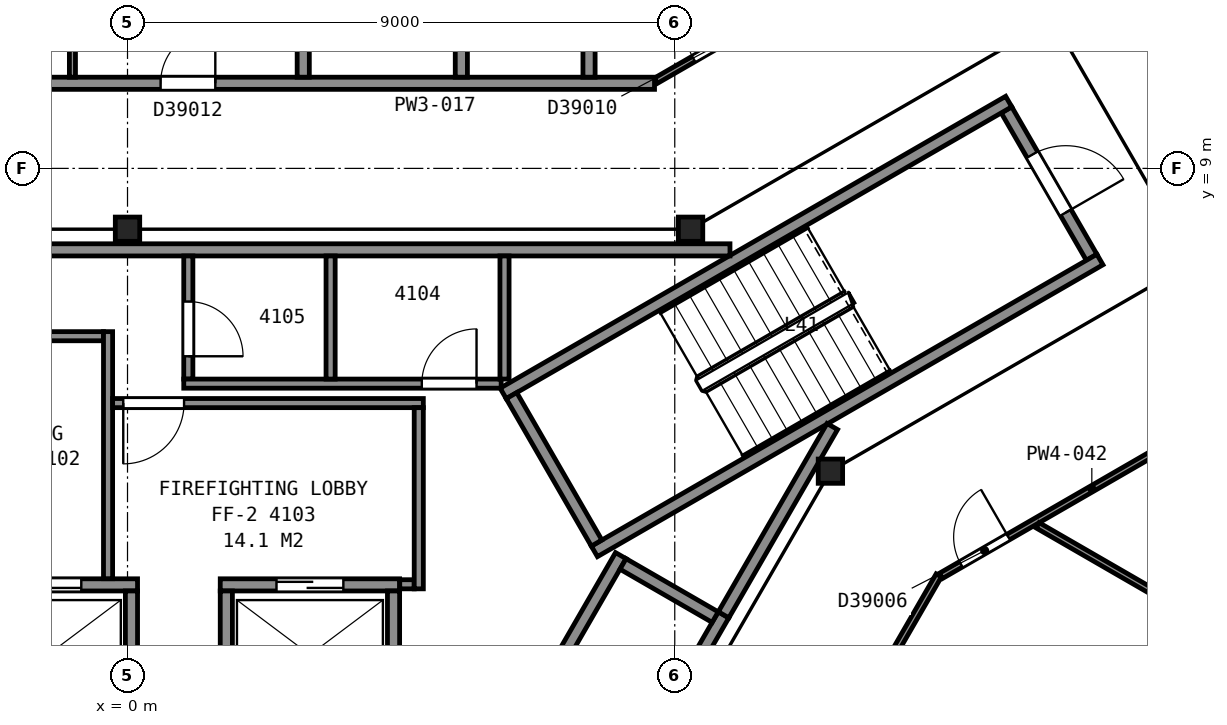
"""IFC4 building model, lengths in metres.
Left out: names, types, materials, properties, quantities, classifications, styles, units other than length and angle.
Written with IfcOpenShell. Run it as: python <this file> out.ifc"""

import sys

from ifc_helpers import new_model, si_unit, direction, frame, frame_2d, origin, origin_2d, place, context, subcontext, project, spatial, rectangle, i_section, extrude, element, fill, save


model = new_model("IFC4")
c1 = context("Model", 3, precision=1e-05, world=origin(), true_north=direction((0.0, 1.0)))
c2 = subcontext(c1, "Body", "Model", "MODEL_VIEW")
j1 = project(units=[si_unit("LENGTHUNIT", "METRE"), si_unit("PLANEANGLEUNIT", "RADIAN")], contexts=[c1])
p1 = place(None, origin())
s1 = spatial("IfcSite", under=j1, at=p1, CompositionType="ELEMENT")
p2 = place(p1, origin())
s2 = spatial("IfcBuilding", under=s1, at=p2, CompositionType="ELEMENT")
p3 = place(p2, frame((0.0, 0.0, 167.3)))
s3 = spatial("IfcBuildingStorey", under=s2, at=p3, CompositionType="ELEMENT", Elevation=167.3)
for number, where, z_axis, x_axis in (
    (1, (11.56, 4.02, 0.0), (0.0, 0.0, 1.0), (1.0, 0.0, 0.0)),
    (2, (9.26, 8.0, 0.0), (0.0, 0.0, 1.0), (1.0, 0.0, 0.0)),
    (3, (0.0, 8.0, 0.0), (0.0, 0.0, 1.0), (1.0, 0.0, 0.0)),
):
    element("IfcColumn", number, at=place(p3, frame(where, z_axis=z_axis, x_axis=x_axis)), inside=s3, PredefinedType="COLUMN", context=c2, shape_type="SweptSolid", body=[
        extrude(i_section(OverallWidth=0.401, OverallDepth=0.399, WebThickness=0.025, FlangeThickness=0.04, FilletRadius=0.015, at=origin_2d()), origin(), (0.0, 0.0, 1.0), 3.7),
    ])
p4 = place(p3, frame((15.855, 7.538, 0.0), z_axis=(0.0, 0.0, 1.0), x_axis=(-0.500049511043, 0.865996816683, 0.0)))
e4 = element("IfcWall", 4, at=p4, inside=s3, PredefinedType="PARTITIONING", context=c2, shape_type="SweptSolid", body=[
    extrude(rectangle(XDim=2.8, YDim=0.2, at=frame_2d((1.4, 0.0))), origin(), (0.0, 0.0, 1.0), 3.45),
])
p5 = place(p4, frame((0.85, 0.0, 0.0)))
e5 = element("IfcOpeningElement", 5, at=p5, cuts=e4, PredefinedType="OPENING", context=c2, shape_type="SweptSolid", body=[
    extrude(rectangle(XDim=1.1, YDim=2.1, at=frame_2d((0.55, 1.05))), frame((0.0, 0.11, 0.0), z_axis=(0.0, -1.0, 0.0), x_axis=(1.0, 0.0, 0.0)), (0.0, 0.0, 1.0), 0.22),
])
for number, where, z_axis, x_axis in (
    (6, (6.178, 5.299, 0.0), (0.0, 0.0, 1.0), (0.866, 0.5, 0.0)),
    (7, (7.678, 2.701, 0.0), (0.0, 0.0, 1.0), (0.866, 0.5, 0.0)),
):
    element("IfcWall", number, at=place(p3, frame(where, z_axis=z_axis, x_axis=x_axis)), inside=s3, PredefinedType="PARTITIONING", context=c2, shape_type="SweptSolid", body=[
        extrude(rectangle(XDim=9.6, YDim=0.2, at=frame_2d((4.8, 0.0))), origin(), (0.0, 0.0, 1.0), 3.45),
    ])
p6 = place(p3, frame((7.715, 2.838, 0.0), z_axis=(0.0, 0.0, 1.0), x_axis=(-0.500049511043, 0.865996816683, 0.0)))
e8 = element("IfcWall", 8, at=p6, inside=s3, PredefinedType="PARTITIONING", context=c2, shape_type="SweptSolid", body=[
    extrude(rectangle(XDim=2.8, YDim=0.2, at=frame_2d((1.4, 0.0))), origin(), (0.0, 0.0, 1.0), 3.45),
])
p7 = place(p3, frame((-2.785, 2.15, 0.0), z_axis=(0.0, 0.0, 1.0), x_axis=(1.0, 0.0, 0.0)))
e9 = element("IfcWall", 9, at=p7, inside=s3, PredefinedType="PARTITIONING", context=c2, shape_type="SweptSolid", body=[
    extrude(rectangle(XDim=2.95, YDim=0.2, at=frame_2d((1.475, 0.0))), origin(), (0.0, 0.0, 1.0), 3.7),
])
p8 = place(p7, frame((0.925, 0.0, 0.0)))
e10 = element("IfcOpeningElement", 10, at=p8, cuts=e9, PredefinedType="OPENING", context=c2, shape_type="SweptSolid", body=[
    extrude(rectangle(XDim=1.1, YDim=2.1, at=frame_2d((0.55, 1.05))), frame((0.0, 0.11, 0.0), z_axis=(0.0, -1.0, 0.0), x_axis=(1.0, 0.0, 0.0)), (0.0, 0.0, 1.0), 0.22),
])
p9 = place(p3, frame((1.525, 2.15, 0.0), z_axis=(0.0, 0.0, 1.0), x_axis=(1.0, 0.0, 0.0)))
e11 = element("IfcWall", 11, at=p9, inside=s3, PredefinedType="PARTITIONING", context=c2, shape_type="SweptSolid", body=[
    extrude(rectangle(XDim=2.95, YDim=0.2, at=frame_2d((1.475, 0.0))), origin(), (0.0, 0.0, 1.0), 3.7),
])
p10 = place(p9, frame((0.925, 0.0, 0.0)))
e12 = element("IfcOpeningElement", 12, at=p10, cuts=e11, PredefinedType="OPENING", context=c2, shape_type="SweptSolid", body=[
    extrude(rectangle(XDim=1.1, YDim=2.1, at=frame_2d((0.55, 1.05))), frame((0.0, 0.11, 0.0), z_axis=(0.0, -1.0, 0.0), x_axis=(1.0, 0.0, 0.0)), (0.0, 0.0, 1.0), 0.22),
])
p11 = place(p3, frame((7.351, -2.587, 0.0), z_axis=(0.0, 0.0, 1.0), x_axis=(0.500002801628, 0.866023786258, 0.0)))
e13 = element("IfcWall", 13, at=p11, inside=s3, PredefinedType="PARTITIONING", context=c2, shape_type="SweptSolid", body=[
    extrude(rectangle(XDim=4.9, YDim=0.2, at=frame_2d((2.45, 0.0))), origin(), (0.0, 0.0, 1.0), 3.7),
])
p12 = place(p3, frame((5.663, -1.612, 0.0), z_axis=(0.0, 0.0, 1.0), x_axis=(0.49998122708, 0.866036242063, 0.0)))
e14 = element("IfcWall", 14, at=p12, inside=s3, PredefinedType="PARTITIONING", context=c2, shape_type="SweptSolid", body=[
    extrude(rectangle(XDim=4.9, YDim=0.2, at=frame_2d((2.45, 0.0))), origin(), (0.0, 0.0, 1.0), 3.7),
])
for number, where, z_axis, x_axis in (
    (15, (4.375, 0.1, 0.0), (0.0, 0.0, 1.0), (0.0, 1.0, 0.0)),
    (16, (1.625, 0.1, 0.0), (0.0, 0.0, 1.0), (0.0, 1.0, 0.0)),
    (17, (0.065, 0.1, 0.0), (0.0, 0.0, 1.0), (0.0, 1.0, 0.0)),
):
    element("IfcWall", number, at=place(p3, frame(where, z_axis=z_axis, x_axis=x_axis)), inside=s3, PredefinedType="PARTITIONING", context=c2, shape_type="SweptSolid", body=[
        extrude(rectangle(XDim=1.95, YDim=0.2, at=frame_2d((0.975, 0.0))), origin(), (0.0, 0.0, 1.0), 3.7),
    ])
p13 = place(p3, frame((9.665, 1.62, 0.0), z_axis=(0.0, 0.0, 1.0), x_axis=(-0.866002029911, 0.500040482552, 0.0)))
e18 = element("IfcWall", 18, at=p13, inside=s3, PredefinedType="PARTITIONING", context=c2, shape_type="SweptSolid", body=[
    extrude(rectangle(XDim=1.75, YDim=0.2, at=frame_2d((0.875, 0.0))), origin(), (0.0, 0.0, 1.0), 3.7),
])
p14 = place(p3, frame((-3.933, 6.24, 0.0), z_axis=(0.0, 0.0, 1.0), x_axis=(1.0, 0.0, 0.0)))
e19 = element("IfcWall", 19, at=p14, inside=s3, PredefinedType="PARTITIONING", context=c2, shape_type="SweptSolid", body=[
    extrude(rectangle(XDim=3.538, YDim=0.15, at=frame_2d((1.769, 0.0))), origin(), (0.0, 0.0, 1.0), 3.45),
])
p15 = place(p14, frame((1.3, 0.0, 0.0)))
e20 = element("IfcOpeningElement", 20, at=p15, cuts=e19, PredefinedType="OPENING", context=c2, shape_type="SweptSolid", body=[
    extrude(rectangle(XDim=1.0, YDim=2.1, at=frame_2d((0.5, 1.05))), frame((0.0, 0.085, 0.0), z_axis=(0.0, -1.0, 0.0), x_axis=(1.0, 0.0, 0.0)), (0.0, 0.0, 1.0), 0.17),
])
p16 = place(p3, frame((-3.933, 7.66, 0.0), z_axis=(0.0, 0.0, 1.0), x_axis=(1.0, 0.0, 0.0)))
e21 = element("IfcWall", 21, at=p16, inside=s3, PredefinedType="PARTITIONING", context=c2, shape_type="SweptSolid", body=[
    extrude(rectangle(XDim=13.841, YDim=0.2, at=frame_2d((6.92, 0.0))), origin(), (0.0, 0.0, 1.0), 3.45),
])
p17 = place(p3, frame((-0.32, 2.252, 0.0), z_axis=(0.0, 0.0, 1.0), x_axis=(0.0, 1.0, 0.0)))
e22 = element("IfcWall", 22, at=p17, inside=s3, PredefinedType="PARTITIONING", context=c2, shape_type="SweptSolid", body=[
    extrude(rectangle(XDim=4.063, YDim=0.15, at=frame_2d((2.031, 0.0))), origin(), (0.0, 0.0, 1.0), 3.45),
])
p18 = place(p3, frame((-0.245, 5.14, 0.0), z_axis=(0.0, 0.0, 1.0), x_axis=(1.0, 0.0, 0.0)))
e23 = element("IfcWall", 23, at=p18, inside=s3, PredefinedType="PARTITIONING", context=c2, shape_type="SweptSolid", body=[
    extrude(rectangle(XDim=5.11, YDim=0.15, at=frame_2d((2.555, 0.0))), origin(), (0.0, 0.0, 1.0), 3.45),
])
p19 = place(p18, frame((0.175, 0.0, 0.0)))
e24 = element("IfcOpeningElement", 24, at=p19, cuts=e23, PredefinedType="OPENING", context=c2, shape_type="SweptSolid", body=[
    extrude(rectangle(XDim=1.0, YDim=2.1, at=frame_2d((0.5, 1.05))), frame((0.0, 0.085, 0.0), z_axis=(0.0, -1.0, 0.0), x_axis=(1.0, 0.0, 0.0)), (0.0, 0.0, 1.0), 0.17),
])
p20 = place(p3, frame((1.0, 7.56, 0.0), z_axis=(0.0, 0.0, 1.0), x_axis=(0.0, -1.0, 0.0)))
e25 = element("IfcWall", 25, at=p20, inside=s3, PredefinedType="PARTITIONING", context=c2, shape_type="SweptSolid", body=[
    extrude(rectangle(XDim=2.025, YDim=0.15, at=frame_2d((1.013, 0.0))), origin(), (0.0, 0.0, 1.0), 3.45),
])
p21 = place(p20, frame((0.75, 0.0, 0.0)))
e26 = element("IfcOpeningElement", 26, at=p21, cuts=e25, PredefinedType="OPENING", context=c2, shape_type="SweptSolid", body=[
    extrude(rectangle(XDim=0.9, YDim=2.1, at=frame_2d((0.45, 1.05))), frame((0.0, 0.085, 0.0), z_axis=(0.0, -1.0, 0.0), x_axis=(1.0, 0.0, 0.0)), (0.0, 0.0, 1.0), 0.17),
])
p22 = place(p3, frame((0.925, 5.46, 0.0), z_axis=(0.0, 0.0, 1.0), x_axis=(1.0, 0.0, 0.0)))
e27 = element("IfcWall", 27, at=p22, inside=s3, PredefinedType="PARTITIONING", context=c2, shape_type="SweptSolid", body=[
    extrude(rectangle(XDim=5.22, YDim=0.15, at=frame_2d((2.61, 0.0))), origin(), (0.0, 0.0, 1.0), 3.45),
])
p23 = place(p22, frame((3.915, 0.0, 0.0)))
e28 = element("IfcOpeningElement", 28, at=p23, cuts=e27, PredefinedType="OPENING", context=c2, shape_type="SweptSolid", body=[
    extrude(rectangle(XDim=0.9, YDim=2.1, at=frame_2d((0.45, 1.05))), frame((0.0, 0.085, 0.0), z_axis=(0.0, -1.0, 0.0), x_axis=(1.0, 0.0, 0.0)), (0.0, 0.0, 1.0), 0.17),
])
p24 = place(p3, frame((3.34, 5.535, 0.0), z_axis=(0.0, 0.0, 1.0), x_axis=(0.0, 1.0, 0.0)))
e29 = element("IfcWall", 29, at=p24, inside=s3, PredefinedType="PARTITIONING", context=c2, shape_type="SweptSolid", body=[
    extrude(rectangle(XDim=2.025, YDim=0.15, at=frame_2d((1.013, 0.0))), origin(), (0.0, 0.0, 1.0), 3.45),
])
p25 = place(p3, frame((4.477, 2.16, 0.0), z_axis=(0.0, 0.0, 1.0), x_axis=(1.0, 0.0, 0.0)))
e30 = element("IfcWall", 30, at=p25, inside=s3, PredefinedType="PARTITIONING", context=c2, shape_type="SweptSolid", body=[
    extrude(rectangle(XDim=0.238, YDim=0.15, at=frame_2d((0.119, 0.0))), origin(), (0.0, 0.0, 1.0), 3.45),
])
p26 = place(p3, frame((4.79, 2.085, 0.0), z_axis=(0.0, 0.0, 1.0), x_axis=(0.0, 1.0, 0.0)))
e31 = element("IfcWall", 31, at=p26, inside=s3, PredefinedType="PARTITIONING", context=c2, shape_type="SweptSolid", body=[
    extrude(rectangle(XDim=2.98, YDim=0.15, at=frame_2d((1.49, 0.0))), origin(), (0.0, 0.0, 1.0), 3.45),
])
p27 = place(p3, frame((6.2, 5.535, 0.0), z_axis=(0.0, 0.0, 1.0), x_axis=(0.0, 1.0, 0.0)))
e32 = element("IfcWall", 32, at=p27, inside=s3, PredefinedType="PARTITIONING", context=c2, shape_type="SweptSolid", body=[
    extrude(rectangle(XDim=2.025, YDim=0.15, at=frame_2d((1.013, 0.0))), origin(), (0.0, 0.0, 1.0), 3.45),
])
p28 = place(p3, frame((9.803, 1.658, 0.0), z_axis=(0.0, 0.0, 1.0), x_axis=(0.499943114462, 0.866058244174, 0.0)))
e33 = element("IfcWall", 33, at=p28, inside=s3, PredefinedType="PARTITIONING", context=c2, shape_type="SweptSolid", body=[
    extrude(rectangle(XDim=3.576, YDim=0.2, at=frame_2d((1.788, 0.0))), origin(), (0.0, 0.0, 1.0), 3.45),
])
p29 = place(p3, frame((-8.667, 10.4, 0.0), z_axis=(0.0, 0.0, 1.0), x_axis=(1.0, 0.0, 0.0)))
e34 = element("IfcWall", 34, at=p29, inside=s3, PredefinedType="PARTITIONING", context=c2, shape_type="SweptSolid", body=[
    extrude(rectangle(XDim=17.334, YDim=0.2, at=frame_2d((8.667, 0.0))), origin(), (0.0, 0.0, 1.0), 2.713),
])
p30 = place(p29, frame((9.211, 0.0, 0.0)))
e35 = element("IfcOpeningElement", 35, at=p30, cuts=e34, PredefinedType="OPENING", context=c2, shape_type="SweptSolid", body=[
    extrude(rectangle(XDim=0.9, YDim=2.1, at=frame_2d((0.45, 1.05))), frame((0.0, 0.11, 0.0), z_axis=(0.0, -1.0, 0.0), x_axis=(1.0, 0.0, 0.0)), (0.0, 0.0, 1.0), 0.22),
])
p31 = place(p29, frame((4.857, 0.0, 0.0)))
e36 = element("IfcOpeningElement", 36, at=p31, cuts=e34, PredefinedType="OPENING", context=c2, shape_type="SweptSolid", body=[
    extrude(rectangle(XDim=0.9, YDim=2.1, at=frame_2d((0.45, 1.05))), frame((0.0, 0.11, 0.0), z_axis=(0.0, -1.0, 0.0), x_axis=(1.0, 0.0, 0.0)), (0.0, 0.0, 1.0), 0.22),
])
p32 = place(p29, frame((1.0, 0.0, 0.0)))
e37 = element("IfcOpeningElement", 37, at=p32, cuts=e34, PredefinedType="OPENING", context=c2, shape_type="SweptSolid", body=[
    extrude(rectangle(XDim=0.9, YDim=2.1, at=frame_2d((0.45, 1.05))), frame((0.0, 0.11, 0.0), z_axis=(0.0, -1.0, 0.0), x_axis=(1.0, 0.0, 0.0)), (0.0, 0.0, 1.0), 0.22),
])
p33 = place(p3, frame((-0.906, 10.5, 0.0), z_axis=(0.0, 0.0, 1.0), x_axis=(0.0, 1.0, 0.0)))
e38 = element("IfcWall", 38, at=p33, inside=s3, PredefinedType="PARTITIONING", context=c2, shape_type="SweptSolid", body=[
    extrude(rectangle(XDim=6.435, YDim=0.1, at=frame_2d((3.218, 0.0))), origin(), (0.0, 0.0, 1.0), 2.713),
])
p34 = place(p3, frame((2.89, 13.5, 0.0), z_axis=(0.0, 0.0, 1.0), x_axis=(0.0, -1.0, 0.0)))
e39 = element("IfcWall", 39, at=p34, inside=s3, PredefinedType="PARTITIONING", context=c2, shape_type="SweptSolid", body=[
    extrude(rectangle(XDim=3.0, YDim=0.2, at=frame_2d((1.5, 0.0))), origin(), (0.0, 0.0, 1.0), 2.713),
])
p35 = place(p34, frame((1.2, 0.0, 0.0)))
e40 = element("IfcOpeningElement", 40, at=p35, cuts=e39, PredefinedType="OPENING", context=c2, shape_type="SweptSolid", body=[
    extrude(rectangle(XDim=0.8, YDim=2.1, at=frame_2d((0.4, 1.05))), frame((0.0, 0.11, 0.0), z_axis=(0.0, -1.0, 0.0), x_axis=(1.0, 0.0, 0.0)), (0.0, 0.0, 1.0), 0.22),
])
p36 = place(p3, frame((13.342, 2.306, 0.0), z_axis=(0.0, 0.0, 1.0), x_axis=(-0.49997635812, -0.866039053, 0.0)))
e41 = element("IfcWall", 41, at=p36, inside=s3, PredefinedType="PARTITIONING", context=c2, shape_type="SweptSolid", body=[
    extrude(rectangle(XDim=17.285, YDim=0.1, at=frame_2d((8.643, 0.0))), origin(), (0.0, 0.0, 1.0), 2.713),
])
p37 = place(p36, frame((15.585, 0.0, 0.0)))
e42 = element("IfcOpeningElement", 42, at=p37, cuts=e41, PredefinedType="OPENING", context=c2, shape_type="SweptSolid", body=[
    extrude(rectangle(XDim=0.9, YDim=2.1, at=frame_2d((0.45, 1.05))), frame((0.0, 0.06, 0.0), z_axis=(0.0, -1.0, 0.0), x_axis=(1.0, 0.0, 0.0)), (0.0, 0.0, 1.0), 0.12),
])
p38 = place(p36, frame((11.595, 0.0, 0.0)))
e43 = element("IfcOpeningElement", 43, at=p38, cuts=e41, PredefinedType="OPENING", context=c2, shape_type="SweptSolid", body=[
    extrude(rectangle(XDim=0.9, YDim=2.1, at=frame_2d((0.45, 1.05))), frame((0.0, 0.06, 0.0), z_axis=(0.0, -1.0, 0.0), x_axis=(1.0, 0.0, 0.0)), (0.0, 0.0, 1.0), 0.12),
])
p39 = place(p36, frame((6.171, 0.0, 0.0)))
e44 = element("IfcOpeningElement", 44, at=p39, cuts=e41, PredefinedType="OPENING", context=c2, shape_type="SweptSolid", body=[
    extrude(rectangle(XDim=0.9, YDim=2.1, at=frame_2d((0.45, 1.05))), frame((0.0, 0.06, 0.0), z_axis=(0.0, -1.0, 0.0), x_axis=(1.0, 0.0, 0.0)), (0.0, 0.0, 1.0), 0.12),
])
p40 = place(p3, frame((5.49, 10.5, 0.0), z_axis=(0.0, 0.0, 1.0), x_axis=(0.0, 1.0, 0.0)))
e45 = element("IfcWall", 45, at=p40, inside=s3, PredefinedType="PARTITIONING", context=c2, shape_type="SweptSolid", body=[
    extrude(rectangle(XDim=6.435, YDim=0.2, at=frame_2d((3.218, 0.0))), origin(), (0.0, 0.0, 1.0), 2.713),
])
p41 = place(p3, frame((7.59, 10.5, 0.0), z_axis=(0.0, 0.0, 1.0), x_axis=(0.0, 1.0, 0.0)))
e46 = element("IfcWall", 46, at=p41, inside=s3, PredefinedType="PARTITIONING", context=c2, shape_type="SweptSolid", body=[
    extrude(rectangle(XDim=2.8, YDim=0.2, at=frame_2d((1.4, 0.0))), origin(), (0.0, 0.0, 1.0), 2.713),
])
p42 = place(p3, frame((8.691, 10.442, 0.0), z_axis=(0.0, 0.0, 1.0), x_axis=(0.866070360466, 0.499922124658, 0.0)))
e47 = element("IfcWall", 47, at=p42, inside=s3, PredefinedType="PARTITIONING", context=c2, shape_type="SweptSolid", body=[
    extrude(rectangle(XDim=8.503, YDim=0.1, at=frame_2d((4.251, 0.0))), origin(), (0.0, 0.0, 1.0), 2.713),
])
p43 = place(p42, frame((4.758, 0.0, 0.0)))
e48 = element("IfcOpeningElement", 48, at=p43, cuts=e47, PredefinedType="OPENING", context=c2, shape_type="SweptSolid", body=[
    extrude(rectangle(XDim=0.9, YDim=2.1, at=frame_2d((0.45, 1.05))), frame((0.0, 0.06, 0.0), z_axis=(0.0, -1.0, 0.0), x_axis=(1.0, 0.0, 0.0)), (0.0, 0.0, 1.0), 0.12),
])
p44 = place(p42, frame((0.715, 0.0, 0.0)))
e49 = element("IfcOpeningElement", 49, at=p44, cuts=e47, PredefinedType="OPENING", context=c2, shape_type="SweptSolid", body=[
    extrude(rectangle(XDim=0.9, YDim=2.1, at=frame_2d((0.45, 1.05))), frame((0.0, 0.06, 0.0), z_axis=(0.0, -1.0, 0.0), x_axis=(1.0, 0.0, 0.0)), (0.0, 0.0, 1.0), 0.12),
])
p45 = place(p3, frame((20.756, 6.557, 0.0), z_axis=(0.0, 0.0, 1.0), x_axis=(-0.866069146081, -0.499924228466, 0.0)))
e50 = element("IfcWall", 50, at=p45, inside=s3, PredefinedType="PARTITIONING", context=c2, shape_type="SweptSolid", body=[
    extrude(rectangle(XDim=8.519, YDim=0.1, at=frame_2d((4.259, 0.0))), origin(), (0.0, 0.0, 1.0), 2.713),
])
p46 = place(p45, frame((7.239, 0.0, 0.0)))
e51 = element("IfcOpeningElement", 51, at=p46, cuts=e50, PredefinedType="OPENING", context=c2, shape_type="SweptSolid", body=[
    extrude(rectangle(XDim=0.9, YDim=2.1, at=frame_2d((0.45, 1.05))), frame((0.0, 0.06, 0.0), z_axis=(0.0, -1.0, 0.0), x_axis=(1.0, 0.0, 0.0)), (0.0, 0.0, 1.0), 0.12),
])
p47 = place(p45, frame((3.169, 0.0, 0.0)))
e52 = element("IfcOpeningElement", 52, at=p47, cuts=e50, PredefinedType="OPENING", context=c2, shape_type="SweptSolid", body=[
    extrude(rectangle(XDim=0.9, YDim=2.1, at=frame_2d((0.45, 1.05))), frame((0.0, 0.06, 0.0), z_axis=(0.0, -1.0, 0.0), x_axis=(1.0, 0.0, 0.0)), (0.0, 0.0, 1.0), 0.12),
])
p48 = place(p3, frame((14.968, 3.13, 0.0), z_axis=(0.0, 0.0, 1.0), x_axis=(0.866001282423, -0.500041777097, 0.0)))
e53 = element("IfcWall", 53, at=p48, inside=s3, PredefinedType="PARTITIONING", context=c2, shape_type="SweptSolid", body=[
    extrude(rectangle(XDim=5.537, YDim=0.1, at=frame_2d((2.769, 0.0))), origin(), (0.0, 0.0, 1.0), 2.713),
])
p49 = place(p3, frame((16.073, 14.761, 0.0), z_axis=(0.0, 0.0, 1.0), x_axis=(0.500297300687, -0.865853689098, 0.0)))
e54 = element("IfcWall", 54, at=p49, inside=s3, PredefinedType="PARTITIONING", context=c2, shape_type="SweptSolid", body=[
    extrude(rectangle(XDim=9.496, YDim=0.1, at=frame_2d((4.748, 0.0))), origin(), (0.0, 0.0, 1.0), 2.713),
])
p50 = place(p49, frame((4.15, 0.0, 0.0)))
e55 = element("IfcOpeningElement", 55, at=p50, cuts=e54, PredefinedType="OPENING", context=c2, shape_type="SweptSolid", body=[
    extrude(rectangle(XDim=1.2, YDim=2.1, at=frame_2d((0.6, 1.05))), frame((0.0, 0.06, 0.0), z_axis=(0.0, -1.0, 0.0), x_axis=(1.0, 0.0, 0.0)), (0.0, 0.0, 1.0), 0.12),
])
p51 = place(p5, origin())
e56 = element("IfcDoor", 56, at=p51, inside=s3, OperationType="SINGLE_SWING_LEFT", PredefinedType="DOOR", context=c2, shape_type="SweptSolid", body=[
    extrude(rectangle(XDim=1.1, YDim=2.1, at=frame_2d((0.55, 1.05))), frame((0.0, 0.025, 0.0), z_axis=(0.0, -1.0, 0.0), x_axis=(1.0, 0.0, 0.0)), (0.0, 0.0, 1.0), 0.05),
])
fill(e5, e56)
p52 = place(p8, origin())
e57 = element("IfcDoor", 57, at=p52, inside=s3, OperationType="SLIDING_TO_LEFT", PredefinedType="DOOR", context=c2, shape_type="SweptSolid", body=[
    extrude(rectangle(XDim=1.1, YDim=2.1, at=frame_2d((0.55, 1.05))), frame((0.0, 0.025, 0.0), z_axis=(0.0, -1.0, 0.0), x_axis=(1.0, 0.0, 0.0)), (0.0, 0.0, 1.0), 0.05),
])
fill(e10, e57)
p53 = place(p10, origin())
e58 = element("IfcDoor", 58, at=p53, inside=s3, OperationType="SLIDING_TO_RIGHT", PredefinedType="DOOR", context=c2, shape_type="SweptSolid", body=[
    extrude(rectangle(XDim=1.1, YDim=2.1, at=frame_2d((0.55, 1.05))), frame((0.0, 0.025, 0.0), z_axis=(0.0, -1.0, 0.0), x_axis=(1.0, 0.0, 0.0)), (0.0, 0.0, 1.0), 0.05),
])
fill(e12, e58)
p54 = place(p19, origin())
e59 = element("IfcDoor", 59, at=p54, inside=s3, OperationType="SINGLE_SWING_LEFT", PredefinedType="DOOR", context=c2, shape_type="SweptSolid", body=[
    extrude(rectangle(XDim=1.0, YDim=2.1, at=frame_2d((0.5, 1.05))), frame((0.0, 0.025, 0.0), z_axis=(0.0, -1.0, 0.0), x_axis=(1.0, 0.0, 0.0)), (0.0, 0.0, 1.0), 0.05),
])
fill(e24, e59)
p55 = place(p21, origin())
e60 = element("IfcDoor", 60, at=p55, inside=s3, OperationType="SINGLE_SWING_RIGHT", PredefinedType="DOOR", context=c2, shape_type="SweptSolid", body=[
    extrude(rectangle(XDim=0.9, YDim=2.1, at=frame_2d((0.45, 1.05))), frame((0.0, 0.025, 0.0), z_axis=(0.0, -1.0, 0.0), x_axis=(1.0, 0.0, 0.0)), (0.0, 0.0, 1.0), 0.05),
])
fill(e26, e60)
p56 = place(p23, origin())
e61 = element("IfcDoor", 61, at=p56, inside=s3, OperationType="SINGLE_SWING_RIGHT", PredefinedType="DOOR", context=c2, shape_type="SweptSolid", body=[
    extrude(rectangle(XDim=0.9, YDim=2.1, at=frame_2d((0.45, 1.05))), frame((0.0, 0.025, 0.0), z_axis=(0.0, -1.0, 0.0), x_axis=(1.0, 0.0, 0.0)), (0.0, 0.0, 1.0), 0.05),
])
fill(e28, e61)
p57 = place(p30, origin())
e62 = element("IfcDoor", 62, at=p57, inside=s3, OperationType="SINGLE_SWING_RIGHT", PredefinedType="DOOR", context=c2, shape_type="SweptSolid", body=[
    extrude(rectangle(XDim=0.9, YDim=2.1, at=frame_2d((0.45, 1.05))), frame((0.0, 0.025, 0.0), z_axis=(0.0, -1.0, 0.0), x_axis=(1.0, 0.0, 0.0)), (0.0, 0.0, 1.0), 0.05),
])
fill(e35, e62)
p58 = place(p44, origin())
e63 = element("IfcDoor", 63, at=p58, inside=s3, OperationType="SINGLE_SWING_RIGHT", PredefinedType="DOOR", context=c2, shape_type="SweptSolid", body=[
    extrude(rectangle(XDim=0.9, YDim=2.1, at=frame_2d((0.45, 1.05))), frame((0.0, 0.025, 0.0), z_axis=(0.0, -1.0, 0.0), x_axis=(1.0, 0.0, 0.0)), (0.0, 0.0, 1.0), 0.05),
])
fill(e49, e63)
p59 = place(p46, origin())
e64 = element("IfcDoor", 64, at=p59, inside=s3, OperationType="SINGLE_SWING_LEFT", PredefinedType="DOOR", context=c2, shape_type="SweptSolid", body=[
    extrude(rectangle(XDim=0.9, YDim=2.1, at=frame_2d((0.45, 1.05))), frame((0.0, 0.025, 0.0), z_axis=(0.0, -1.0, 0.0), x_axis=(1.0, 0.0, 0.0)), (0.0, 0.0, 1.0), 0.05),
])
fill(e51, e64)
save(model, sys.argv[1])
